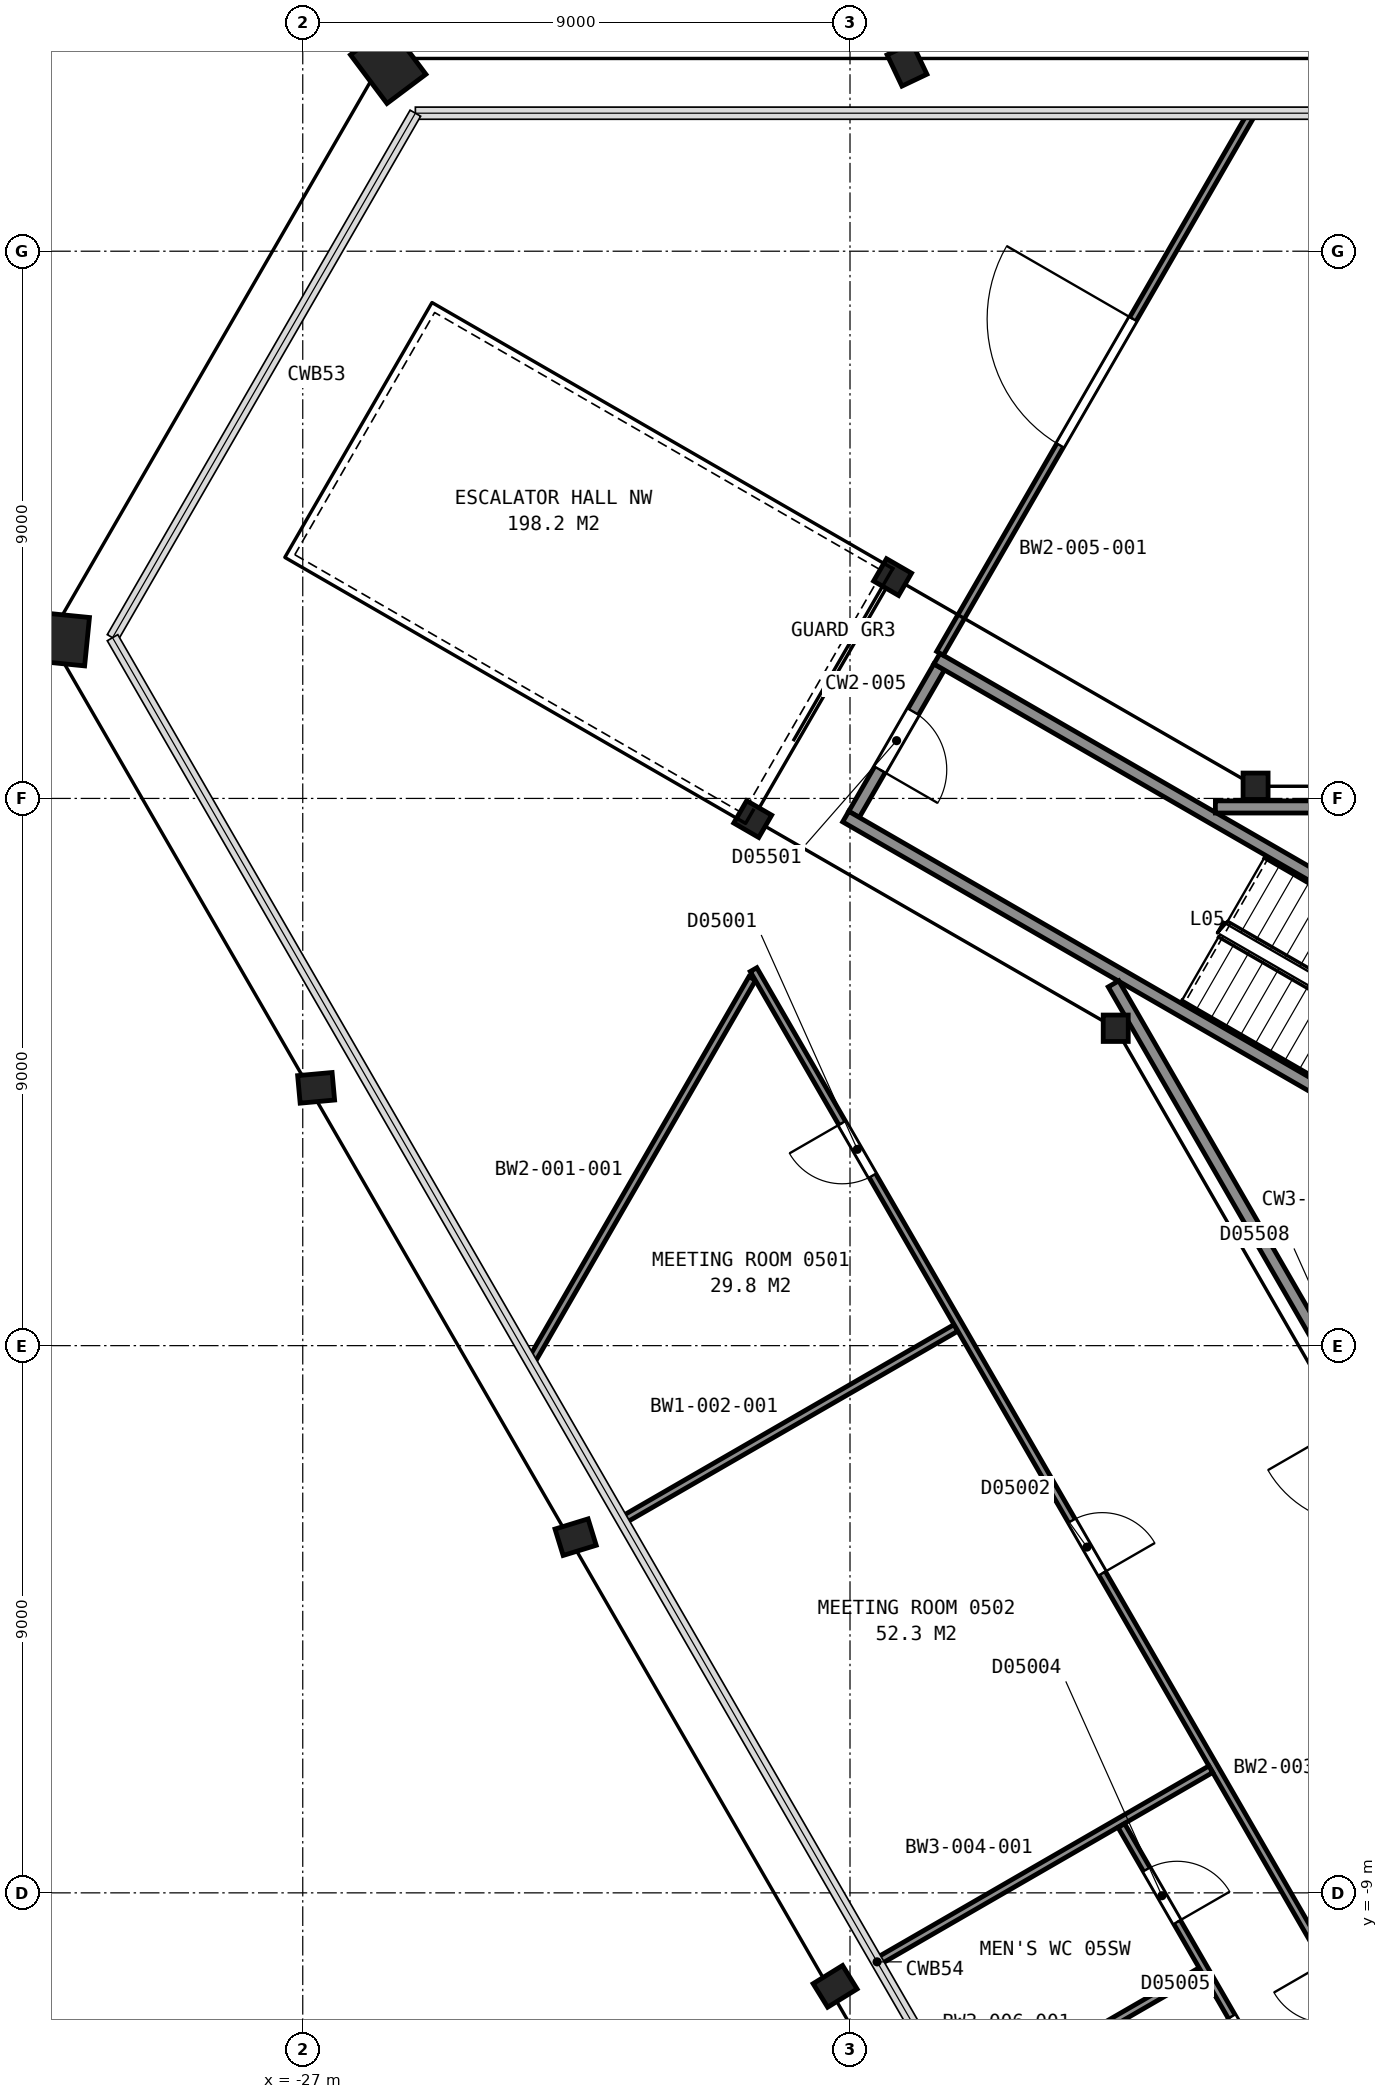
"""IFC4 building model, lengths in metres.
Left out: names, types, materials, properties, quantities, classifications, styles, units other than length and angle.
Written with IfcOpenShell. Run it as: python <this file> out.ifc"""

import sys

from ifc_helpers import new_model, si_unit, direction, frame, frame_2d, origin, origin_2d, place, context, subcontext, project, spatial, rectangle, hollow_rectangle, i_section, extrude, element, fill, save


model = new_model("IFC4")
c1 = context("Model", 3, precision=1e-05, world=origin(), true_north=direction((0.0, 1.0)))
c2 = subcontext(c1, "Body", "Model", "MODEL_VIEW")
j1 = project(units=[si_unit("LENGTHUNIT", "METRE"), si_unit("PLANEANGLEUNIT", "RADIAN")], contexts=[c1])
p1 = place(None, origin())
s1 = spatial("IfcSite", under=j1, at=p1, CompositionType="ELEMENT")
p2 = place(p1, origin())
s2 = spatial("IfcBuilding", under=s1, at=p2, CompositionType="ELEMENT")
p3 = place(p2, frame((0.0, 0.0, 32.0)))
s3 = spatial("IfcBuildingStorey", under=s2, at=p3, CompositionType="ELEMENT", Elevation=32.0)
p4 = place(p3, frame((-17.109, 21.167, 0.03), z_axis=(0.039441005649, -0.082985106815, 0.995769993081), x_axis=(0.999217228346, 0.000227977802, -0.039558546511)))
e1 = element("IfcColumn", 1, at=p4, inside=s3, PredefinedType="COLUMN", context=c2, shape_type="SweptSolid", body=[
    extrude(i_section(OverallWidth=0.455, OverallDepth=0.569, WebThickness=0.078, FlangeThickness=0.125, FilletRadius=0.015, at=origin_2d()), origin(), (0.0, 0.0, 1.0), 4.76),
])
p5 = place(p3, frame((-25.667, 21.166, 0.045), z_axis=(0.06217640116, -0.082901868214, 0.994616195015), x_axis=(0.499582435164, 0.865300616168, 0.040892959465)))
e2 = element("IfcColumn", 2, at=p5, inside=s3, PredefinedType="COLUMN", context=c2, shape_type="SweptSolid", body=[
    extrude(hollow_rectangle(XDim=0.8, YDim=1.0, WallThickness=0.075, at=origin_2d()), origin(), (0.0, 0.0, 1.0), 4.735),
])
p6 = place(p3, frame((-31.165, 11.639, 0.045), z_axis=(0.103570826852, -0.010310684605, 0.994568636952), x_axis=(0.499154841001, 0.865444824509, -0.043008143825)))
e3 = element("IfcColumn", 3, at=p6, inside=s3, PredefinedType="COLUMN", context=c2, shape_type="SweptSolid", body=[
    extrude(hollow_rectangle(XDim=0.8, YDim=1.0, WallThickness=0.075, at=origin_2d()), origin(), (0.0, 0.0, 1.0), 4.736),
])
p7 = place(p3, frame((-26.887, 4.23, 0.03), z_axis=(0.091244770768, 0.008308967321, 0.995793830504), x_axis=(-0.499759929446, 0.865304652417, 0.03857293643)))
e4 = element("IfcColumn", 4, at=p7, inside=s3, PredefinedType="COLUMN", context=c2, shape_type="SweptSolid", body=[
    extrude(i_section(OverallWidth=0.455, OverallDepth=0.569, WebThickness=0.078, FlangeThickness=0.125, FilletRadius=0.015, at=origin_2d()), origin(), (0.0, 0.0, 1.0), 4.76),
])
p8 = place(p3, frame((-22.608, -3.179, 0.025), z_axis=(0.080968116055, 0.024940842833, 0.996404595805), x_axis=(-0.500178646621, 0.865714310263, 0.018975101316)))
e5 = element("IfcColumn", 5, at=p8, inside=s3, PredefinedType="COLUMN", context=c2, shape_type="SweptSolid", body=[
    extrude(i_section(OverallWidth=0.455, OverallDepth=0.569, WebThickness=0.078, FlangeThickness=0.125, FilletRadius=0.015, at=origin_2d()), origin(), (0.0, 0.0, 1.0), 4.767),
])
p9 = place(p3, frame((-18.328, -10.589, 0.025), z_axis=(0.070582350376, 0.043588955131, 0.996553126936), x_axis=(-0.499945117104, 0.866053561357, -0.002471587651)))
e6 = element("IfcColumn", 6, at=p9, inside=s3, PredefinedType="COLUMN", context=c2, shape_type="SweptSolid", body=[
    extrude(i_section(OverallWidth=0.455, OverallDepth=0.569, WebThickness=0.078, FlangeThickness=0.125, FilletRadius=0.015, at=origin_2d()), origin(), (0.0, 0.0, 1.0), 4.766),
])
p10 = place(p3, frame((-11.33, 9.2, 0.0), z_axis=(0.0, 0.0, 1.0), x_axis=(1.0, 0.0, 0.0)))
e7 = element("IfcColumn", 7, at=p10, inside=s3, PredefinedType="COLUMN", context=c2, shape_type="SweptSolid", body=[
    extrude(i_section(OverallWidth=0.411, OverallDepth=0.434, WebThickness=0.036, FlangeThickness=0.057, FilletRadius=0.015, at=origin_2d()), origin(), (0.0, 0.0, 1.0), 4.8),
])
for number, where, z_axis, x_axis in (
    (8, (-17.3, 12.64, 0.0), (0.0, 0.0, 1.0), (0.5, 0.866, 0.0)),
    (9, (-19.6, 8.66, 0.0), (0.0, 0.0, 1.0), (0.5, 0.866, 0.0)),
):
    element("IfcColumn", number, at=place(p3, frame(where, z_axis=z_axis, x_axis=x_axis)), inside=s3, PredefinedType="COLUMN", context=c2, shape_type="SweptSolid", body=[
        extrude(i_section(OverallWidth=0.424, OverallDepth=0.475, WebThickness=0.048, FlangeThickness=0.077, FilletRadius=0.015, at=origin_2d()), origin(), (0.0, 0.0, 1.0), 4.8),
    ])
p11 = place(p3, frame((-13.63, 5.22, 0.0), z_axis=(0.0, 0.0, 1.0), x_axis=(1.0, 0.0, 0.0)))
e10 = element("IfcColumn", 10, at=p11, inside=s3, PredefinedType="COLUMN", context=c2, shape_type="SweptSolid", body=[
    extrude(i_section(OverallWidth=0.411, OverallDepth=0.434, WebThickness=0.036, FlangeThickness=0.057, FilletRadius=0.015, at=origin_2d()), origin(), (0.0, 0.0, 1.0), 4.8),
])
p12 = place(p3, frame((-16.534, 11.162, 0.0), z_axis=(0.0, 0.0, 1.0), x_axis=(-0.49998411664, -0.866034573852, 0.0)))
e11 = element("IfcWall", 11, at=p12, inside=s3, PredefinedType="PARTITIONING", context=c2, shape_type="SweptSolid", body=[
    extrude(rectangle(XDim=2.8, YDim=0.2, at=frame_2d((1.4, 0.0))), origin(), (0.0, 0.0, 1.0), 4.55),
])
p13 = place(p12, frame((0.85, 0.0, 0.0)))
e12 = element("IfcOpeningElement", 12, at=p13, cuts=e11, PredefinedType="OPENING", context=c2, shape_type="SweptSolid", body=[
    extrude(rectangle(XDim=1.1, YDim=2.1, at=frame_2d((0.55, 1.05))), frame((0.0, 0.11, 0.0), z_axis=(0.0, -1.0, 0.0), x_axis=(1.0, 0.0, 0.0)), (0.0, 0.0, 1.0), 0.22),
])
for number, where, z_axis, x_axis in (
    (13, (-7.678, 2.701, 0.0), (0.0, 0.0, 1.0), (-0.866, 0.5, 0.0)),
    (14, (-6.178, 5.299, 0.0), (0.0, 0.0, 1.0), (-0.866, 0.5, 0.0)),
):
    element("IfcWall", number, at=place(p3, frame(where, z_axis=z_axis, x_axis=x_axis)), inside=s3, PredefinedType="PARTITIONING", context=c2, shape_type="SweptSolid", body=[
        extrude(rectangle(XDim=12.0, YDim=0.2, at=frame_2d((6.0, 0.0))), origin(), (0.0, 0.0, 1.0), 4.55),
    ])
p14 = place(p3, frame((-13.666, 5.95, 0.0), z_axis=(0.0, 0.0, 1.0), x_axis=(0.499985890914, -0.866033549516, 0.0)))
e15 = element("IfcWall", 15, at=p14, inside=s3, PredefinedType="PARTITIONING", context=c2, shape_type="SweptSolid", body=[
    extrude(rectangle(XDim=14.921, YDim=0.2, at=frame_2d((7.461, 0.0))), origin(), (0.0, 0.0, 1.0), 4.55),
])
p15 = place(p14, frame((8.196, 0.0, 0.0)))
e16 = element("IfcOpeningElement", 16, at=p15, cuts=e15, PredefinedType="OPENING", context=c2, shape_type="SweptSolid", body=[
    extrude(rectangle(XDim=1.8, YDim=2.1, at=frame_2d((0.9, 1.05))), frame((0.0, 0.11, 0.0), z_axis=(0.0, -1.0, 0.0), x_axis=(1.0, 0.0, 0.0)), (0.0, 0.0, 1.0), 0.22),
])
p16 = place(p3, frame((0.263, 8.86, 0.0), z_axis=(0.0, 0.0, 1.0), x_axis=(-1.0, 0.0, 0.0)))
e17 = element("IfcWall", 17, at=p16, inside=s3, PredefinedType="PARTITIONING", context=c2, shape_type="SweptSolid", body=[
    extrude(rectangle(XDim=12.254, YDim=0.2, at=frame_2d((6.127, 0.0))), origin(), (0.0, 0.0, 1.0), 4.55),
])
p17 = place(p16, frame((5.473, 0.0, 0.0)))
e18 = element("IfcOpeningElement", 18, at=p17, cuts=e17, PredefinedType="OPENING", context=c2, shape_type="SweptSolid", body=[
    extrude(rectangle(XDim=1.8, YDim=2.1, at=frame_2d((0.9, 1.05))), frame((0.0, 0.11, 0.0), z_axis=(0.0, -1.0, 0.0), x_axis=(1.0, 0.0, 0.0)), (0.0, 0.0, 1.0), 0.22),
])
p18 = place(p3, frame((-23.25, -0.27, 0.0), z_axis=(0.0, 0.0, 1.0), x_axis=(0.500002873931, 0.866023744513, 0.0)))
e19 = element("IfcWall", 19, at=p18, inside=s3, PredefinedType="PARTITIONING", context=c2, shape_type="SweptSolid", body=[
    extrude(rectangle(XDim=7.285, YDim=0.125, at=frame_2d((3.643, 0.0))), origin(), (0.0, 0.0, 1.0), 4.64),
])
p19 = place(p3, frame((-21.746, -2.875, 0.0), z_axis=(0.0, 0.0, 1.0), x_axis=(0.866118237319, 0.499839173118, 0.0)))
e20 = element("IfcWall", 20, at=p19, inside=s3, PredefinedType="PARTITIONING", context=c2, shape_type="SweptSolid", body=[
    extrude(rectangle(XDim=6.337, YDim=0.125, at=frame_2d((3.169, 0.0))), origin(), (0.0, 0.0, 1.0), 3.793),
])
p20 = place(p3, frame((-4.438, -20.054, 0.0), z_axis=(0.0, 0.0, 1.0), x_axis=(-0.499994028088, 0.866028851642, 0.0)))
e21 = element("IfcWall", 21, at=p20, inside=s3, PredefinedType="PARTITIONING", context=c2, shape_type="SweptSolid", body=[
    extrude(rectangle(XDim=30.297, YDim=0.125, at=frame_2d((15.148, 0.0))), origin(), (0.0, 0.0, 1.0), 3.793),
])
p21 = place(p20, frame((26.385, 0.0, 0.0)))
e22 = element("IfcOpeningElement", 22, at=p21, cuts=e21, PredefinedType="OPENING", context=c2, shape_type="SweptSolid", body=[
    extrude(rectangle(XDim=1.0, YDim=2.1, at=frame_2d((0.5, 1.05))), frame((0.0, 0.073, 0.0), z_axis=(0.0, -1.0, 0.0), x_axis=(1.0, 0.0, 0.0)), (0.0, 0.0, 1.0), 0.145),
])
p22 = place(p20, frame((18.831, 0.0, 0.0)))
e23 = element("IfcOpeningElement", 23, at=p22, cuts=e21, PredefinedType="OPENING", context=c2, shape_type="SweptSolid", body=[
    extrude(rectangle(XDim=1.0, YDim=2.1, at=frame_2d((0.5, 1.05))), frame((0.0, 0.073, 0.0), z_axis=(0.0, -1.0, 0.0), x_axis=(1.0, 0.0, 0.0)), (0.0, 0.0, 1.0), 0.145),
])
p23 = place(p20, frame((10.449, 0.0, 0.0)))
e24 = element("IfcOpeningElement", 24, at=p23, cuts=e21, PredefinedType="OPENING", context=c2, shape_type="SweptSolid", body=[
    extrude(rectangle(XDim=1.0, YDim=2.1, at=frame_2d((0.5, 1.05))), frame((0.0, 0.073, 0.0), z_axis=(0.0, -1.0, 0.0), x_axis=(1.0, 0.0, 0.0)), (0.0, 0.0, 1.0), 0.145),
])
p24 = place(p20, frame((2.916, 0.0, 0.0)))
e25 = element("IfcOpeningElement", 25, at=p24, cuts=e21, PredefinedType="OPENING", context=c2, shape_type="SweptSolid", body=[
    extrude(rectangle(XDim=1.0, YDim=2.1, at=frame_2d((0.5, 1.05))), frame((0.0, 0.073, 0.0), z_axis=(0.0, -1.0, 0.0), x_axis=(1.0, 0.0, 0.0)), (0.0, 0.0, 1.0), 0.145),
])
p25 = place(p3, frame((-17.554, -10.135, 0.0), z_axis=(0.0, 0.0, 1.0), x_axis=(0.866003371142, 0.500038159714, 0.0)))
e26 = element("IfcWall", 26, at=p25, inside=s3, PredefinedType="PARTITIONING", context=c2, shape_type="SweptSolid", body=[
    extrude(rectangle(XDim=6.337, YDim=0.125, at=frame_2d((3.168, 0.0))), origin(), (0.0, 0.0, 1.0), 3.793),
])
p26 = place(p3, frame((-11.391, 20.27, 0.0), z_axis=(0.0, 0.0, 1.0), x_axis=(-0.499978599175, -0.866037759204, 0.0)))
e27 = element("IfcWall", 27, at=p26, inside=s3, PredefinedType="PARTITIONING", context=c2, shape_type="SweptSolid", body=[
    extrude(rectangle(XDim=10.258, YDim=0.125, at=frame_2d((5.129, 0.0))), origin(), (0.0, 0.0, 1.0), 3.793),
])
p27 = place(p26, frame((3.908, 0.0, 0.0)))
e28 = element("IfcOpeningElement", 28, at=p27, cuts=e27, PredefinedType="OPENING", context=c2, shape_type="SweptSolid", body=[
    extrude(rectangle(XDim=2.4, YDim=2.4, at=frame_2d((1.2, 1.2))), frame((0.0, 0.073, 0.0), z_axis=(0.0, -1.0, 0.0), x_axis=(1.0, 0.0, 0.0)), (0.0, 0.0, 1.0), 0.145),
])
p28 = place(p3, frame((-16.157, -12.555, 0.0), z_axis=(0.0, 0.0, 1.0), x_axis=(0.866009042838, 0.50002833692, 0.0)))
e29 = element("IfcWall", 29, at=p28, inside=s3, PredefinedType="PARTITIONING", context=c2, shape_type="SweptSolid", body=[
    extrude(rectangle(XDim=4.537, YDim=0.125, at=frame_2d((2.269, 0.0))), origin(), (0.0, 0.0, 1.0), 4.64),
])
p29 = place(p3, frame((-9.41, -15.041, 0.0), z_axis=(0.0, 0.0, 1.0), x_axis=(-0.500068128175, 0.865986066391, 0.0)))
e30 = element("IfcWall", 30, at=p29, inside=s3, PredefinedType="PARTITIONING", context=c2, shape_type="SweptSolid", body=[
    extrude(rectangle(XDim=8.253, YDim=0.125, at=frame_2d((4.126, 0.0))), origin(), (0.0, 0.0, 1.0), 4.64),
])
p30 = place(p29, frame((6.421, 0.0, 0.0)))
e31 = element("IfcOpeningElement", 31, at=p30, cuts=e30, PredefinedType="OPENING", context=c2, shape_type="SweptSolid", body=[
    extrude(rectangle(XDim=1.0, YDim=2.1, at=frame_2d((0.5, 1.05))), frame((0.0, 0.073, 0.0), z_axis=(0.0, -1.0, 0.0), x_axis=(1.0, 0.0, 0.0)), (0.0, 0.0, 1.0), 0.145),
])
p31 = place(p29, frame((3.627, 0.0, 0.0)))
e32 = element("IfcOpeningElement", 32, at=p31, cuts=e30, PredefinedType="OPENING", context=c2, shape_type="SweptSolid", body=[
    extrude(rectangle(XDim=1.0, YDim=2.1, at=frame_2d((0.5, 1.05))), frame((0.0, 0.073, 0.0), z_axis=(0.0, -1.0, 0.0), x_axis=(1.0, 0.0, 0.0)), (0.0, 0.0, 1.0), 0.145),
])
p32 = place(p29, frame((0.832, 0.0, 0.0)))
e33 = element("IfcOpeningElement", 33, at=p32, cuts=e30, PredefinedType="OPENING", context=c2, shape_type="SweptSolid", body=[
    extrude(rectangle(XDim=1.0, YDim=2.1, at=frame_2d((0.5, 1.05))), frame((0.0, 0.073, 0.0), z_axis=(0.0, -1.0, 0.0), x_axis=(1.0, 0.0, 0.0)), (0.0, 0.0, 1.0), 0.145),
])
p33 = place(p13, origin())
e34 = element("IfcDoor", 34, at=p33, inside=s3, OperationType="SINGLE_SWING_RIGHT", PredefinedType="DOOR", context=c2, shape_type="SweptSolid", body=[
    extrude(rectangle(XDim=1.1, YDim=2.1, at=frame_2d((0.55, 1.05))), frame((0.0, 0.025, 0.0), z_axis=(0.0, -1.0, 0.0), x_axis=(1.0, 0.0, 0.0)), (0.0, 0.0, 1.0), 0.05),
])
fill(e12, e34)
p34 = place(p21, origin())
e35 = element("IfcDoor", 35, at=p34, inside=s3, OperationType="SINGLE_SWING_RIGHT", PredefinedType="DOOR", context=c2, shape_type="SweptSolid", body=[
    extrude(rectangle(XDim=1.0, YDim=2.1, at=frame_2d((0.5, 1.05))), frame((0.0, 0.025, 0.0), z_axis=(0.0, -1.0, 0.0), x_axis=(1.0, 0.0, 0.0)), (0.0, 0.0, 1.0), 0.05),
])
fill(e22, e35)
p35 = place(p22, origin())
e36 = element("IfcDoor", 36, at=p35, inside=s3, OperationType="SINGLE_SWING_LEFT", PredefinedType="DOOR", context=c2, shape_type="SweptSolid", body=[
    extrude(rectangle(XDim=1.0, YDim=2.1, at=frame_2d((0.5, 1.05))), frame((0.0, 0.025, 0.0), z_axis=(0.0, -1.0, 0.0), x_axis=(1.0, 0.0, 0.0)), (0.0, 0.0, 1.0), 0.05),
])
fill(e23, e36)
p36 = place(p27, origin())
e37 = element("IfcDoor", 37, at=p36, inside=s3, OperationType="DOUBLE_DOOR_SINGLE_SWING", PredefinedType="DOOR", context=c2, shape_type="SweptSolid", body=[
    extrude(rectangle(XDim=2.4, YDim=2.4, at=frame_2d((1.2, 1.2))), frame((0.0, 0.025, 0.0), z_axis=(0.0, -1.0, 0.0), x_axis=(1.0, 0.0, 0.0)), (0.0, 0.0, 1.0), 0.05),
])
fill(e28, e37)
p37 = place(p30, origin())
e38 = element("IfcDoor", 38, at=p37, inside=s3, OperationType="SINGLE_SWING_LEFT", PredefinedType="DOOR", context=c2, shape_type="SweptSolid", body=[
    extrude(rectangle(XDim=1.0, YDim=2.1, at=frame_2d((0.5, 1.05))), frame((0.0, 0.025, 0.0), z_axis=(0.0, -1.0, 0.0), x_axis=(1.0, 0.0, 0.0)), (0.0, 0.0, 1.0), 0.05),
])
fill(e31, e38)
p38 = place(p31, origin())
e39 = element("IfcDoor", 39, at=p38, inside=s3, OperationType="SINGLE_SWING_RIGHT", PredefinedType="DOOR", context=c2, shape_type="SweptSolid", body=[
    extrude(rectangle(XDim=1.0, YDim=2.1, at=frame_2d((0.5, 1.05))), frame((0.0, 0.025, 0.0), z_axis=(0.0, -1.0, 0.0), x_axis=(1.0, 0.0, 0.0)), (0.0, 0.0, 1.0), 0.05),
])
fill(e32, e39)
save(model, sys.argv[1])
